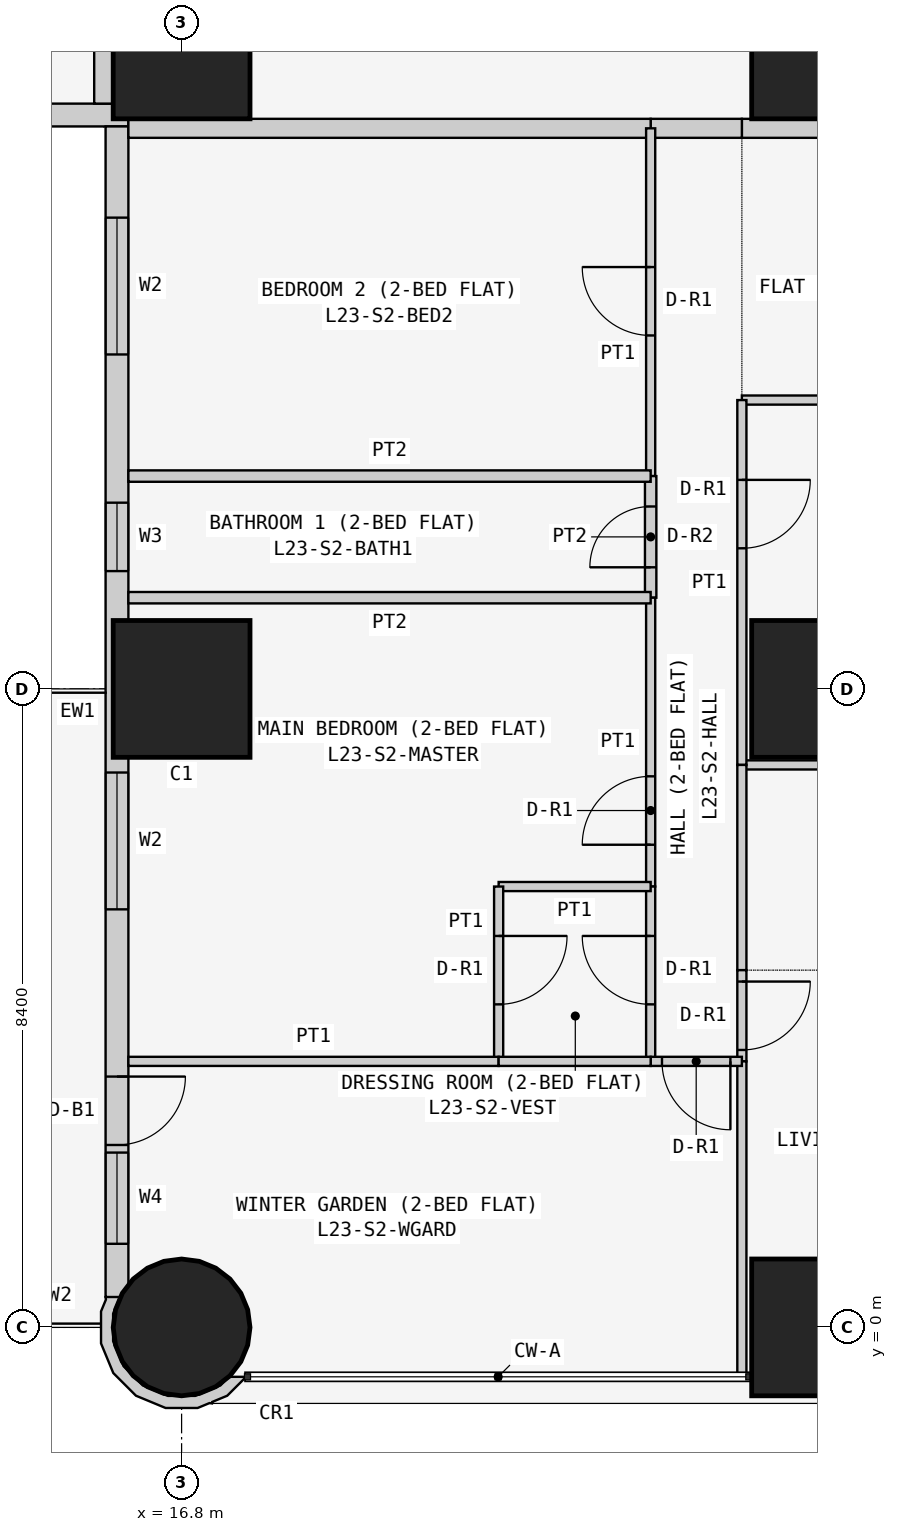
"""IFC4 building model, lengths in metres.
Left out: names, types, materials, properties, quantities, classifications, styles, units other than length and angle.
Written with IfcOpenShell. Run it as: python <this file> out.ifc"""

import sys

from ifc_helpers import new_model, si_unit, direction, frame, frame_2d, origin, origin_2d, place, context, subcontext, project, spatial, polyline, rectangle, circle, outline, extrude, element, fill, save


model = new_model("IFC4")
c1 = context("Model", 3, precision=1e-05, world=origin(), true_north=direction((0.0, 1.0)))
c2 = subcontext(c1, "Body", "Model", "MODEL_VIEW")
j1 = project(units=[si_unit("LENGTHUNIT", "METRE"), si_unit("PLANEANGLEUNIT", "RADIAN")], contexts=[c1])
p1 = place(None, origin())
s1 = spatial("IfcSite", under=j1, at=p1, CompositionType="ELEMENT")
p2 = place(p1, origin())
s2 = spatial("IfcBuilding", under=s1, at=p2, CompositionType="ELEMENT")
p3 = place(p2, frame((0.0, 0.0, 92.1)))
s3 = spatial("IfcBuildingStorey", under=s2, at=p3, CompositionType="ELEMENT", Elevation=92.1)
p4 = place(p3, frame((16.8, 0.0, 0.0), z_axis=(0.0, 0.0, 1.0), x_axis=(1.0, 0.0, 0.0)))
e1 = element("IfcColumn", 1, at=p4, inside=s3, PredefinedType="COLUMN", context=c2, shape_type="SweptSolid", body=[
    extrude(circle(Radius=0.9, at=origin_2d()), origin(), (0.0, 0.0, 1.0), 3.6),
])
for number, where, z_axis, x_axis in (
    (2, (16.8, 8.4, 0.0), (0.0, 0.0, 1.0), (1.0, 0.0, 0.0)),
    (3, (16.8, 16.8, 0.0), (0.0, 0.0, 1.0), (1.0, 0.0, 0.0)),
    (4, (25.2, 0.0, 0.0), (0.0, 0.0, 1.0), (1.0, 0.0, 0.0)),
    (5, (25.2, 8.4, 0.0), (0.0, 0.0, 1.0), (1.0, 0.0, 0.0)),
    (6, (25.2, 16.8, 0.0), (0.0, 0.0, 1.0), (1.0, 0.0, 0.0)),
):
    element("IfcColumn", number, at=place(p3, frame(where, z_axis=z_axis, x_axis=x_axis)), inside=s3, PredefinedType="COLUMN", context=c2, shape_type="SweptSolid", body=[
        extrude(rectangle(XDim=1.8, YDim=1.8, at=origin_2d()), origin(), (0.0, 0.0, 1.0), 3.6),
    ])
p5 = place(p3, frame((0.4, 15.95, 0.0), z_axis=(0.0, 0.0, 1.0), x_axis=(1.0, 0.0, 0.0)))
e7 = element("IfcWall", 7, at=p5, inside=s3, PredefinedType="SOLIDWALL", context=c2, shape_type="SweptSolid", body=[
    extrude(rectangle(XDim=15.7, YDim=0.3, at=frame_2d((7.85, 0.0))), origin(), (0.0, 0.0, 1.0), 3.45),
])
p6 = place(p5, frame((12.4, 0.0, 0.9)))
e8 = element("IfcOpeningElement", 8, at=p6, cuts=e7, PredefinedType="OPENING", context=c2, shape_type="SweptSolid", body=[
    extrude(rectangle(XDim=1.8, YDim=1.5, at=frame_2d((0.9, 0.75))), frame((0.0, 0.16, 0.0), z_axis=(0.0, -1.0, 0.0), x_axis=(1.0, 0.0, 0.0)), (0.0, 0.0, 1.0), 0.32),
])
p7 = place(p5, frame((9.55, 0.0, 1.5)))
e9 = element("IfcOpeningElement", 9, at=p7, cuts=e7, PredefinedType="OPENING", context=c2, shape_type="SweptSolid", body=[
    extrude(rectangle(XDim=0.9, YDim=0.7, at=frame_2d((0.45, 0.35))), frame((0.0, 0.16, 0.0), z_axis=(0.0, -1.0, 0.0), x_axis=(1.0, 0.0, 0.0)), (0.0, 0.0, 1.0), 0.32),
])
p8 = place(p5, frame((5.1, 0.0, 0.9)))
e10 = element("IfcOpeningElement", 10, at=p8, cuts=e7, PredefinedType="OPENING", context=c2, shape_type="SweptSolid", body=[
    extrude(rectangle(XDim=1.8, YDim=1.5, at=frame_2d((0.9, 0.75))), frame((0.0, 0.16, 0.0), z_axis=(0.0, -1.0, 0.0), x_axis=(1.0, 0.0, 0.0)), (0.0, 0.0, 1.0), 0.32),
])
p9 = place(p5, frame((2.0, 0.0, 0.0)))
e11 = element("IfcOpeningElement", 11, at=p9, cuts=e7, PredefinedType="OPENING", context=c2, shape_type="SweptSolid", body=[
    extrude(rectangle(XDim=0.9, YDim=2.4, at=frame_2d((0.45, 1.2))), frame((0.0, 0.16, 0.0), z_axis=(0.0, -1.0, 0.0), x_axis=(1.0, 0.0, 0.0)), (0.0, 0.0, 1.0), 0.32),
])
p10 = place(p5, frame((0.7, 0.0, 0.9)))
e12 = element("IfcOpeningElement", 12, at=p10, cuts=e7, PredefinedType="OPENING", context=c2, shape_type="SweptSolid", body=[
    extrude(rectangle(XDim=1.2, YDim=1.5, at=frame_2d((0.6, 0.75))), frame((0.0, 0.16, 0.0), z_axis=(0.0, -1.0, 0.0), x_axis=(1.0, 0.0, 0.0)), (0.0, 0.0, 1.0), 0.32),
])
p11 = place(p3, frame((15.95, 15.8, 0.0), z_axis=(0.0, 0.0, 1.0), x_axis=(0.0, -1.0, 0.0)))
e13 = element("IfcWall", 13, at=p11, inside=s3, PredefinedType="SOLIDWALL", context=c2, shape_type="SweptSolid", body=[
    extrude(rectangle(XDim=15.4, YDim=0.3, at=frame_2d((7.7, 0.0))), origin(), (0.0, 0.0, 1.0), 3.45),
])
p12 = place(p11, frame((1.2, 0.0, 0.9)))
e14 = element("IfcOpeningElement", 14, at=p12, cuts=e13, PredefinedType="OPENING", context=c2, shape_type="SweptSolid", body=[
    extrude(rectangle(XDim=1.8, YDim=1.5, at=frame_2d((0.9, 0.75))), frame((0.0, 0.16, 0.0), z_axis=(0.0, -1.0, 0.0), x_axis=(1.0, 0.0, 0.0)), (0.0, 0.0, 1.0), 0.32),
])
p13 = place(p11, frame((4.95, 0.0, 1.5)))
e15 = element("IfcOpeningElement", 15, at=p13, cuts=e13, PredefinedType="OPENING", context=c2, shape_type="SweptSolid", body=[
    extrude(rectangle(XDim=0.9, YDim=0.7, at=frame_2d((0.45, 0.35))), frame((0.0, 0.16, 0.0), z_axis=(0.0, -1.0, 0.0), x_axis=(1.0, 0.0, 0.0)), (0.0, 0.0, 1.0), 0.32),
])
p14 = place(p11, frame((8.5, 0.0, 0.9)))
e16 = element("IfcOpeningElement", 16, at=p14, cuts=e13, PredefinedType="OPENING", context=c2, shape_type="SweptSolid", body=[
    extrude(rectangle(XDim=1.8, YDim=1.5, at=frame_2d((0.9, 0.75))), frame((0.0, 0.16, 0.0), z_axis=(0.0, -1.0, 0.0), x_axis=(1.0, 0.0, 0.0)), (0.0, 0.0, 1.0), 0.32),
])
p15 = place(p11, frame((12.5, 0.0, 0.0)))
e17 = element("IfcOpeningElement", 17, at=p15, cuts=e13, PredefinedType="OPENING", context=c2, shape_type="SweptSolid", body=[
    extrude(rectangle(XDim=0.9, YDim=2.4, at=frame_2d((0.45, 1.2))), frame((0.0, 0.16, 0.0), z_axis=(0.0, -1.0, 0.0), x_axis=(1.0, 0.0, 0.0)), (0.0, 0.0, 1.0), 0.32),
])
p16 = place(p11, frame((13.5, 0.0, 0.9)))
e18 = element("IfcOpeningElement", 18, at=p16, cuts=e13, PredefinedType="OPENING", context=c2, shape_type="SweptSolid", body=[
    extrude(rectangle(XDim=1.2, YDim=1.5, at=frame_2d((0.6, 0.75))), frame((0.0, 0.16, 0.0), z_axis=(0.0, -1.0, 0.0), x_axis=(1.0, 0.0, 0.0)), (0.0, 0.0, 1.0), 0.32),
])
p17 = place(p3, frame((15.89, 0.364, 0.0), z_axis=(0.0, 0.0, 1.0), x_axis=(-0.377204953059, -0.926129809145, 0.0)))
e19 = element("IfcWall", 19, at=p17, inside=s3, PredefinedType="SOLIDWALL", context=c2, shape_type="SweptSolid", body=[
    extrude(outline(polyline([(0.36, 1.803), (0.509, 1.741), (0.761, 1.486), (0.896, 1.154), (0.894, 0.795), (0.755, 0.465), (0.5, 0.213), (0.168, 0.078), (-0.1, 0.08), (0.001, -0.097), (0.03, -0.08), (0.199, -0.081), (0.589, 0.078), (0.889, 0.374), (1.053, 0.763), (1.055, 1.185), (0.896, 1.575), (0.778, 1.695), (0.769, 1.728), (0.75, 1.723), (0.6, 1.875), (0.295, 2.004), (0.281, 1.998), (0.36, 1.803)])), origin(), (0.0, 0.0, 1.0), 3.45),
])
p18 = place(p3, frame((29.4, 15.775, 0.0), z_axis=(0.0, 0.0, 1.0), x_axis=(-1.0, 0.0, 0.0)))
e20 = element("IfcWall", 20, at=p18, inside=s3, PredefinedType="PARTITIONING", context=c2, shape_type="SweptSolid", body=[
    extrude(rectangle(XDim=5.229, YDim=0.25, at=frame_2d((2.615, 0.0))), origin(), (0.0, 0.0, 1.0), 3.45),
])
p19 = place(p18, frame((2.1, 0.0, 0.0)))
e21 = element("IfcOpeningElement", 21, at=p19, cuts=e20, PredefinedType="OPENING", context=c2, shape_type="SweptSolid", body=[
    extrude(rectangle(XDim=1.0, YDim=2.1, at=frame_2d((0.5, 1.05))), frame((0.0, 0.135, 0.0), z_axis=(0.0, -1.0, 0.0), x_axis=(1.0, 0.0, 0.0)), (0.0, 0.0, 1.0), 0.27),
])
p20 = place(p3, frame((24.171, 15.775, 0.0), z_axis=(0.0, 0.0, 1.0), x_axis=(-1.0, 0.0, 0.0)))
e22 = element("IfcWall", 22, at=p20, inside=s3, PredefinedType="PARTITIONING", context=c2, shape_type="SweptSolid", body=[
    extrude(rectangle(XDim=1.2, YDim=0.25, at=frame_2d((0.6, 0.0))), origin(), (0.0, 0.0, 1.0), 3.45),
])
for number, where, z_axis, x_axis in (
    (23, (22.971, 15.775, 0.0), (0.0, 0.0, 1.0), (-1.0, 0.0, 0.0)),
    (24, (15.775, 16.1, 0.0), (0.0, 0.0, 1.0), (0.0, 1.0, 0.0)),
):
    element("IfcWall", number, at=place(p3, frame(where, z_axis=z_axis, x_axis=x_axis)), inside=s3, PredefinedType="PARTITIONING", context=c2, shape_type="SweptSolid", body=[
        extrude(rectangle(XDim=6.871, YDim=0.25, at=frame_2d((3.436, 0.0))), origin(), (0.0, 0.0, 1.0), 3.45),
    ])
for number, where, z_axis, x_axis in (
    (25, (29.4, 12.2, 0.0), (0.0, 0.0, 1.0), (-1.0, 0.0, 0.0)),
    (26, (29.4, 7.4, 0.0), (0.0, 0.0, 1.0), (-1.0, 0.0, 0.0)),
):
    element("IfcWall", number, at=place(p3, frame(where, z_axis=z_axis, x_axis=x_axis)), inside=s3, PredefinedType="PARTITIONING", context=c2, shape_type="SweptSolid", body=[
        extrude(rectangle(XDim=5.229, YDim=0.12, at=frame_2d((2.615, 0.0))), origin(), (0.0, 0.0, 1.0), 3.45),
    ])
p21 = place(p3, frame((24.171, 7.4, 0.0), z_axis=(0.0, 0.0, 1.0), x_axis=(0.0, 1.0, 0.0)))
e27 = element("IfcWall", 27, at=p21, inside=s3, PredefinedType="PARTITIONING", context=c2, shape_type="SweptSolid", body=[
    extrude(rectangle(XDim=4.8, YDim=0.12, at=frame_2d((2.4, 0.0))), origin(), (0.0, 0.0, 1.0), 3.45),
])
p22 = place(p21, frame((2.85, 0.0, 0.0)))
e28 = element("IfcOpeningElement", 28, at=p22, cuts=e27, PredefinedType="OPENING", context=c2, shape_type="SweptSolid", body=[
    extrude(rectangle(XDim=0.9, YDim=2.1, at=frame_2d((0.45, 1.05))), frame((0.0, 0.07, 0.0), z_axis=(0.0, -1.0, 0.0), x_axis=(1.0, 0.0, 0.0)), (0.0, 0.0, 1.0), 0.14),
])
p23 = place(p3, frame((24.171, 4.7, 0.0), z_axis=(0.0, 0.0, 1.0), x_axis=(0.0, 1.0, 0.0)))
e29 = element("IfcWall", 29, at=p23, inside=s3, PredefinedType="PARTITIONING", context=c2, shape_type="SweptSolid", body=[
    extrude(rectangle(XDim=2.7, YDim=0.12, at=frame_2d((1.35, 0.0))), origin(), (0.0, 0.0, 1.0), 3.45),
])
p24 = place(p3, frame((24.171, 3.5, 0.0), z_axis=(0.0, 0.0, 1.0), x_axis=(0.0, 1.0, 0.0)))
e30 = element("IfcWall", 30, at=p24, inside=s3, PredefinedType="PARTITIONING", context=c2, shape_type="SweptSolid", body=[
    extrude(rectangle(XDim=1.2, YDim=0.12, at=frame_2d((0.6, 0.0))), origin(), (0.0, 0.0, 1.0), 3.45),
])
p25 = place(p24, frame((0.15, 0.0, 0.0)))
e31 = element("IfcOpeningElement", 31, at=p25, cuts=e30, PredefinedType="OPENING", context=c2, shape_type="SweptSolid", body=[
    extrude(rectangle(XDim=0.9, YDim=2.1, at=frame_2d((0.45, 1.05))), frame((0.0, 0.07, 0.0), z_axis=(0.0, -1.0, 0.0), x_axis=(1.0, 0.0, 0.0)), (0.0, 0.0, 1.0), 0.14),
])
p26 = place(p3, frame((24.171, -0.65, 0.0), z_axis=(0.0, 0.0, 1.0), x_axis=(0.0, 1.0, 0.0)))
e32 = element("IfcWall", 32, at=p26, inside=s3, PredefinedType="PARTITIONING", context=c2, shape_type="SweptSolid", body=[
    extrude(rectangle(XDim=4.15, YDim=0.12, at=frame_2d((2.075, 0.0))), origin(), (0.0, 0.0, 1.0), 3.45),
])
p27 = place(p3, frame((22.971, 11.2, 0.0), z_axis=(0.0, 0.0, 1.0), x_axis=(0.0, 1.0, 0.0)))
e33 = element("IfcWall", 33, at=p27, inside=s3, PredefinedType="PARTITIONING", context=c2, shape_type="SweptSolid", body=[
    extrude(rectangle(XDim=4.575, YDim=0.12, at=frame_2d((2.288, 0.0))), origin(), (0.0, 0.0, 1.0), 3.45),
])
p28 = place(p27, frame((1.85, 0.0, 0.0)))
e34 = element("IfcOpeningElement", 34, at=p28, cuts=e33, PredefinedType="OPENING", context=c2, shape_type="SweptSolid", body=[
    extrude(rectangle(XDim=0.9, YDim=2.1, at=frame_2d((0.45, 1.05))), frame((0.0, 0.07, 0.0), z_axis=(0.0, -1.0, 0.0), x_axis=(1.0, 0.0, 0.0)), (0.0, 0.0, 1.0), 0.14),
])
p29 = place(p3, frame((22.971, 9.6, 0.0), z_axis=(0.0, 0.0, 1.0), x_axis=(0.0, 1.0, 0.0)))
e35 = element("IfcWall", 35, at=p29, inside=s3, PredefinedType="PARTITIONING", context=c2, shape_type="SweptSolid", body=[
    extrude(rectangle(XDim=1.6, YDim=0.15, at=frame_2d((0.8, 0.0))), origin(), (0.0, 0.0, 1.0), 3.45),
])
p30 = place(p29, frame((0.4, 0.0, 0.0)))
e36 = element("IfcOpeningElement", 36, at=p30, cuts=e35, PredefinedType="OPENING", context=c2, shape_type="SweptSolid", body=[
    extrude(rectangle(XDim=0.8, YDim=2.1, at=frame_2d((0.4, 1.05))), frame((0.0, 0.085, 0.0), z_axis=(0.0, -1.0, 0.0), x_axis=(1.0, 0.0, 0.0)), (0.0, 0.0, 1.0), 0.17),
])
p31 = place(p3, frame((22.971, 5.8, 0.0), z_axis=(0.0, 0.0, 1.0), x_axis=(0.0, 1.0, 0.0)))
e37 = element("IfcWall", 37, at=p31, inside=s3, PredefinedType="PARTITIONING", context=c2, shape_type="SweptSolid", body=[
    extrude(rectangle(XDim=3.8, YDim=0.12, at=frame_2d((1.9, 0.0))), origin(), (0.0, 0.0, 1.0), 3.45),
])
p32 = place(p31, frame((0.55, 0.0, 0.0)))
e38 = element("IfcOpeningElement", 38, at=p32, cuts=e37, PredefinedType="OPENING", context=c2, shape_type="SweptSolid", body=[
    extrude(rectangle(XDim=0.9, YDim=2.1, at=frame_2d((0.45, 1.05))), frame((0.0, 0.07, 0.0), z_axis=(0.0, -1.0, 0.0), x_axis=(1.0, 0.0, 0.0)), (0.0, 0.0, 1.0), 0.14),
])
p33 = place(p3, frame((22.971, 3.5, 0.0), z_axis=(0.0, 0.0, 1.0), x_axis=(0.0, 1.0, 0.0)))
e39 = element("IfcWall", 39, at=p33, inside=s3, PredefinedType="PARTITIONING", context=c2, shape_type="SweptSolid", body=[
    extrude(rectangle(XDim=2.3, YDim=0.12, at=frame_2d((1.15, 0.0))), origin(), (0.0, 0.0, 1.0), 3.45),
])
p34 = place(p33, frame((0.75, 0.0, 0.0)))
e40 = element("IfcOpeningElement", 40, at=p34, cuts=e39, PredefinedType="OPENING", context=c2, shape_type="SweptSolid", body=[
    extrude(rectangle(XDim=0.9, YDim=2.1, at=frame_2d((0.45, 1.05))), frame((0.0, 0.07, 0.0), z_axis=(0.0, -1.0, 0.0), x_axis=(1.0, 0.0, 0.0)), (0.0, 0.0, 1.0), 0.14),
])
p35 = place(p3, frame((24.171, 3.5, 0.0), z_axis=(0.0, 0.0, 1.0), x_axis=(-1.0, 0.0, 0.0)))
e41 = element("IfcWall", 41, at=p35, inside=s3, PredefinedType="PARTITIONING", context=c2, shape_type="SweptSolid", body=[
    extrude(rectangle(XDim=1.2, YDim=0.12, at=frame_2d((0.6, 0.0))), origin(), (0.0, 0.0, 1.0), 3.45),
])
p36 = place(p35, frame((0.151, 0.0, 0.0)))
e42 = element("IfcOpeningElement", 42, at=p36, cuts=e41, PredefinedType="OPENING", context=c2, shape_type="SweptSolid", body=[
    extrude(rectangle(XDim=0.9, YDim=2.1, at=frame_2d((0.45, 1.05))), frame((0.0, 0.07, 0.0), z_axis=(0.0, -1.0, 0.0), x_axis=(1.0, 0.0, 0.0)), (0.0, 0.0, 1.0), 0.14),
])
for number, where, z_axis, x_axis in (
    (43, (22.971, 11.2, 0.0), (0.0, 0.0, 1.0), (-1.0, 0.0, 0.0)),
    (44, (22.971, 9.6, 0.0), (0.0, 0.0, 1.0), (-1.0, 0.0, 0.0)),
):
    element("IfcWall", number, at=place(p3, frame(where, z_axis=z_axis, x_axis=x_axis)), inside=s3, PredefinedType="PARTITIONING", context=c2, shape_type="SweptSolid", body=[
        extrude(rectangle(XDim=6.871, YDim=0.15, at=frame_2d((3.436, 0.0))), origin(), (0.0, 0.0, 1.0), 3.45),
    ])
p37 = place(p3, frame((22.971, 5.8, 0.0), z_axis=(0.0, 0.0, 1.0), x_axis=(-1.0, 0.0, 0.0)))
e45 = element("IfcWall", 45, at=p37, inside=s3, PredefinedType="PARTITIONING", context=c2, shape_type="SweptSolid", body=[
    extrude(rectangle(XDim=2.0, YDim=0.12, at=frame_2d((1.0, 0.0))), origin(), (0.0, 0.0, 1.0), 3.45),
])
p38 = place(p3, frame((20.971, 5.8, 0.0), z_axis=(0.0, 0.0, 1.0), x_axis=(0.0, -1.0, 0.0)))
e46 = element("IfcWall", 46, at=p38, inside=s3, PredefinedType="PARTITIONING", context=c2, shape_type="SweptSolid", body=[
    extrude(rectangle(XDim=2.3, YDim=0.12, at=frame_2d((1.15, 0.0))), origin(), (0.0, 0.0, 1.0), 2.848),
])
p39 = place(p38, frame((0.65, 0.0, 0.0)))
e47 = element("IfcOpeningElement", 47, at=p39, cuts=e46, PredefinedType="OPENING", context=c2, shape_type="SweptSolid", body=[
    extrude(rectangle(XDim=0.9, YDim=2.1, at=frame_2d((0.45, 1.05))), frame((0.0, 0.07, 0.0), z_axis=(0.0, -1.0, 0.0), x_axis=(1.0, 0.0, 0.0)), (0.0, 0.0, 1.0), 0.14),
])
p40 = place(p3, frame((20.971, 3.5, 0.0), z_axis=(0.0, 0.0, 1.0), x_axis=(-1.0, 0.0, 0.0)))
e48 = element("IfcWall", 48, at=p40, inside=s3, PredefinedType="PARTITIONING", context=c2, shape_type="SweptSolid", body=[
    extrude(rectangle(XDim=4.871, YDim=0.12, at=frame_2d((2.436, 0.0))), origin(), (0.0, 0.0, 1.0), 3.45),
])
p41 = place(p3, frame((22.971, 3.5, 0.0), z_axis=(0.0, 0.0, 1.0), x_axis=(-1.0, 0.0, 0.0)))
e49 = element("IfcWall", 49, at=p41, inside=s3, PredefinedType="PARTITIONING", context=c2, shape_type="SweptSolid", body=[
    extrude(rectangle(XDim=2.0, YDim=0.12, at=frame_2d((1.0, 0.0))), origin(), (0.0, 0.0, 1.0), 3.45),
])
p42 = place(p12, origin())
e50 = element("IfcWindow", 50, at=p42, inside=s3, PartitioningType="SINGLE_PANEL", PredefinedType="WINDOW", context=c2, shape_type="SweptSolid", body=[
    extrude(rectangle(XDim=1.8, YDim=1.5, at=frame_2d((0.9, 0.75))), frame((0.0, 0.03, 0.0), z_axis=(0.0, -1.0, 0.0), x_axis=(1.0, 0.0, 0.0)), (0.0, 0.0, 1.0), 0.06),
])
fill(e14, e50)
p43 = place(p13, origin())
e51 = element("IfcWindow", 51, at=p43, inside=s3, PartitioningType="SINGLE_PANEL", PredefinedType="WINDOW", context=c2, shape_type="SweptSolid", body=[
    extrude(rectangle(XDim=0.9, YDim=0.7, at=frame_2d((0.45, 0.35))), frame((0.0, 0.03, 0.0), z_axis=(0.0, -1.0, 0.0), x_axis=(1.0, 0.0, 0.0)), (0.0, 0.0, 1.0), 0.06),
])
fill(e15, e51)
p44 = place(p14, origin())
e52 = element("IfcWindow", 52, at=p44, inside=s3, PartitioningType="SINGLE_PANEL", PredefinedType="WINDOW", context=c2, shape_type="SweptSolid", body=[
    extrude(rectangle(XDim=1.8, YDim=1.5, at=frame_2d((0.9, 0.75))), frame((0.0, 0.03, 0.0), z_axis=(0.0, -1.0, 0.0), x_axis=(1.0, 0.0, 0.0)), (0.0, 0.0, 1.0), 0.06),
])
fill(e16, e52)
p45 = place(p15, origin())
e53 = element("IfcDoor", 53, at=p45, inside=s3, OperationType="SINGLE_SWING_LEFT", PredefinedType="DOOR", context=c2, shape_type="SweptSolid", body=[
    extrude(rectangle(XDim=0.9, YDim=2.4, at=frame_2d((0.45, 1.2))), frame((0.0, 0.025, 0.0), z_axis=(0.0, -1.0, 0.0), x_axis=(1.0, 0.0, 0.0)), (0.0, 0.0, 1.0), 0.05),
])
fill(e17, e53)
p46 = place(p16, origin())
e54 = element("IfcWindow", 54, at=p46, inside=s3, PartitioningType="SINGLE_PANEL", PredefinedType="WINDOW", context=c2, shape_type="SweptSolid", body=[
    extrude(rectangle(XDim=1.2, YDim=1.5, at=frame_2d((0.6, 0.75))), frame((0.0, 0.03, 0.0), z_axis=(0.0, -1.0, 0.0), x_axis=(1.0, 0.0, 0.0)), (0.0, 0.0, 1.0), 0.06),
])
fill(e18, e54)
p47 = place(p22, frame((0.9, 0.0, 0.0), z_axis=(0.0, 0.0, 1.0), x_axis=(-1.0, 0.0, 0.0)))
e55 = element("IfcDoor", 55, at=p47, inside=s3, OperationType="SINGLE_SWING_LEFT", PredefinedType="DOOR", context=c2, shape_type="SweptSolid", body=[
    extrude(rectangle(XDim=0.9, YDim=2.1, at=frame_2d((0.45, 1.05))), frame((0.0, 0.025, 0.0), z_axis=(0.0, -1.0, 0.0), x_axis=(1.0, 0.0, 0.0)), (0.0, 0.0, 1.0), 0.05),
])
fill(e28, e55)
p48 = place(p25, frame((0.9, 0.0, 0.0), z_axis=(0.0, 0.0, 1.0), x_axis=(-1.0, 0.0, 0.0)))
e56 = element("IfcDoor", 56, at=p48, inside=s3, OperationType="SINGLE_SWING_LEFT", PredefinedType="DOOR", context=c2, shape_type="SweptSolid", body=[
    extrude(rectangle(XDim=0.9, YDim=2.1, at=frame_2d((0.45, 1.05))), frame((0.0, 0.025, 0.0), z_axis=(0.0, -1.0, 0.0), x_axis=(1.0, 0.0, 0.0)), (0.0, 0.0, 1.0), 0.05),
])
fill(e31, e56)
p49 = place(p28, origin())
e57 = element("IfcDoor", 57, at=p49, inside=s3, OperationType="SINGLE_SWING_RIGHT", PredefinedType="DOOR", context=c2, shape_type="SweptSolid", body=[
    extrude(rectangle(XDim=0.9, YDim=2.1, at=frame_2d((0.45, 1.05))), frame((0.0, 0.025, 0.0), z_axis=(0.0, -1.0, 0.0), x_axis=(1.0, 0.0, 0.0)), (0.0, 0.0, 1.0), 0.05),
])
fill(e34, e57)
p50 = place(p30, origin())
e58 = element("IfcDoor", 58, at=p50, inside=s3, OperationType="SINGLE_SWING_LEFT", PredefinedType="DOOR", context=c2, shape_type="SweptSolid", body=[
    extrude(rectangle(XDim=0.8, YDim=2.1, at=frame_2d((0.4, 1.05))), frame((0.0, 0.025, 0.0), z_axis=(0.0, -1.0, 0.0), x_axis=(1.0, 0.0, 0.0)), (0.0, 0.0, 1.0), 0.05),
])
fill(e36, e58)
p51 = place(p32, origin())
e59 = element("IfcDoor", 59, at=p51, inside=s3, OperationType="SINGLE_SWING_LEFT", PredefinedType="DOOR", context=c2, shape_type="SweptSolid", body=[
    extrude(rectangle(XDim=0.9, YDim=2.1, at=frame_2d((0.45, 1.05))), frame((0.0, 0.025, 0.0), z_axis=(0.0, -1.0, 0.0), x_axis=(1.0, 0.0, 0.0)), (0.0, 0.0, 1.0), 0.05),
])
fill(e38, e59)
p52 = place(p34, origin())
e60 = element("IfcDoor", 60, at=p52, inside=s3, OperationType="SINGLE_SWING_RIGHT", PredefinedType="DOOR", context=c2, shape_type="SweptSolid", body=[
    extrude(rectangle(XDim=0.9, YDim=2.1, at=frame_2d((0.45, 1.05))), frame((0.0, 0.025, 0.0), z_axis=(0.0, -1.0, 0.0), x_axis=(1.0, 0.0, 0.0)), (0.0, 0.0, 1.0), 0.05),
])
fill(e40, e60)
p53 = place(p39, origin())
e61 = element("IfcDoor", 61, at=p53, inside=s3, OperationType="SINGLE_SWING_LEFT", PredefinedType="DOOR", context=c2, shape_type="SweptSolid", body=[
    extrude(rectangle(XDim=0.9, YDim=2.1, at=frame_2d((0.45, 1.05))), frame((0.0, 0.025, 0.0), z_axis=(0.0, -1.0, 0.0), x_axis=(1.0, 0.0, 0.0)), (0.0, 0.0, 1.0), 0.05),
])
fill(e47, e61)
p54 = place(p36, origin())
e62 = element("IfcDoor", 62, at=p54, inside=s3, OperationType="SINGLE_SWING_LEFT", PredefinedType="DOOR", context=c2, shape_type="SweptSolid", body=[
    extrude(rectangle(XDim=0.9, YDim=2.1, at=frame_2d((0.45, 1.05))), frame((0.0, 0.025, 0.0), z_axis=(0.0, -1.0, 0.0), x_axis=(1.0, 0.0, 0.0)), (0.0, 0.0, 1.0), 0.05),
])
fill(e42, e62)
save(model, sys.argv[1])
